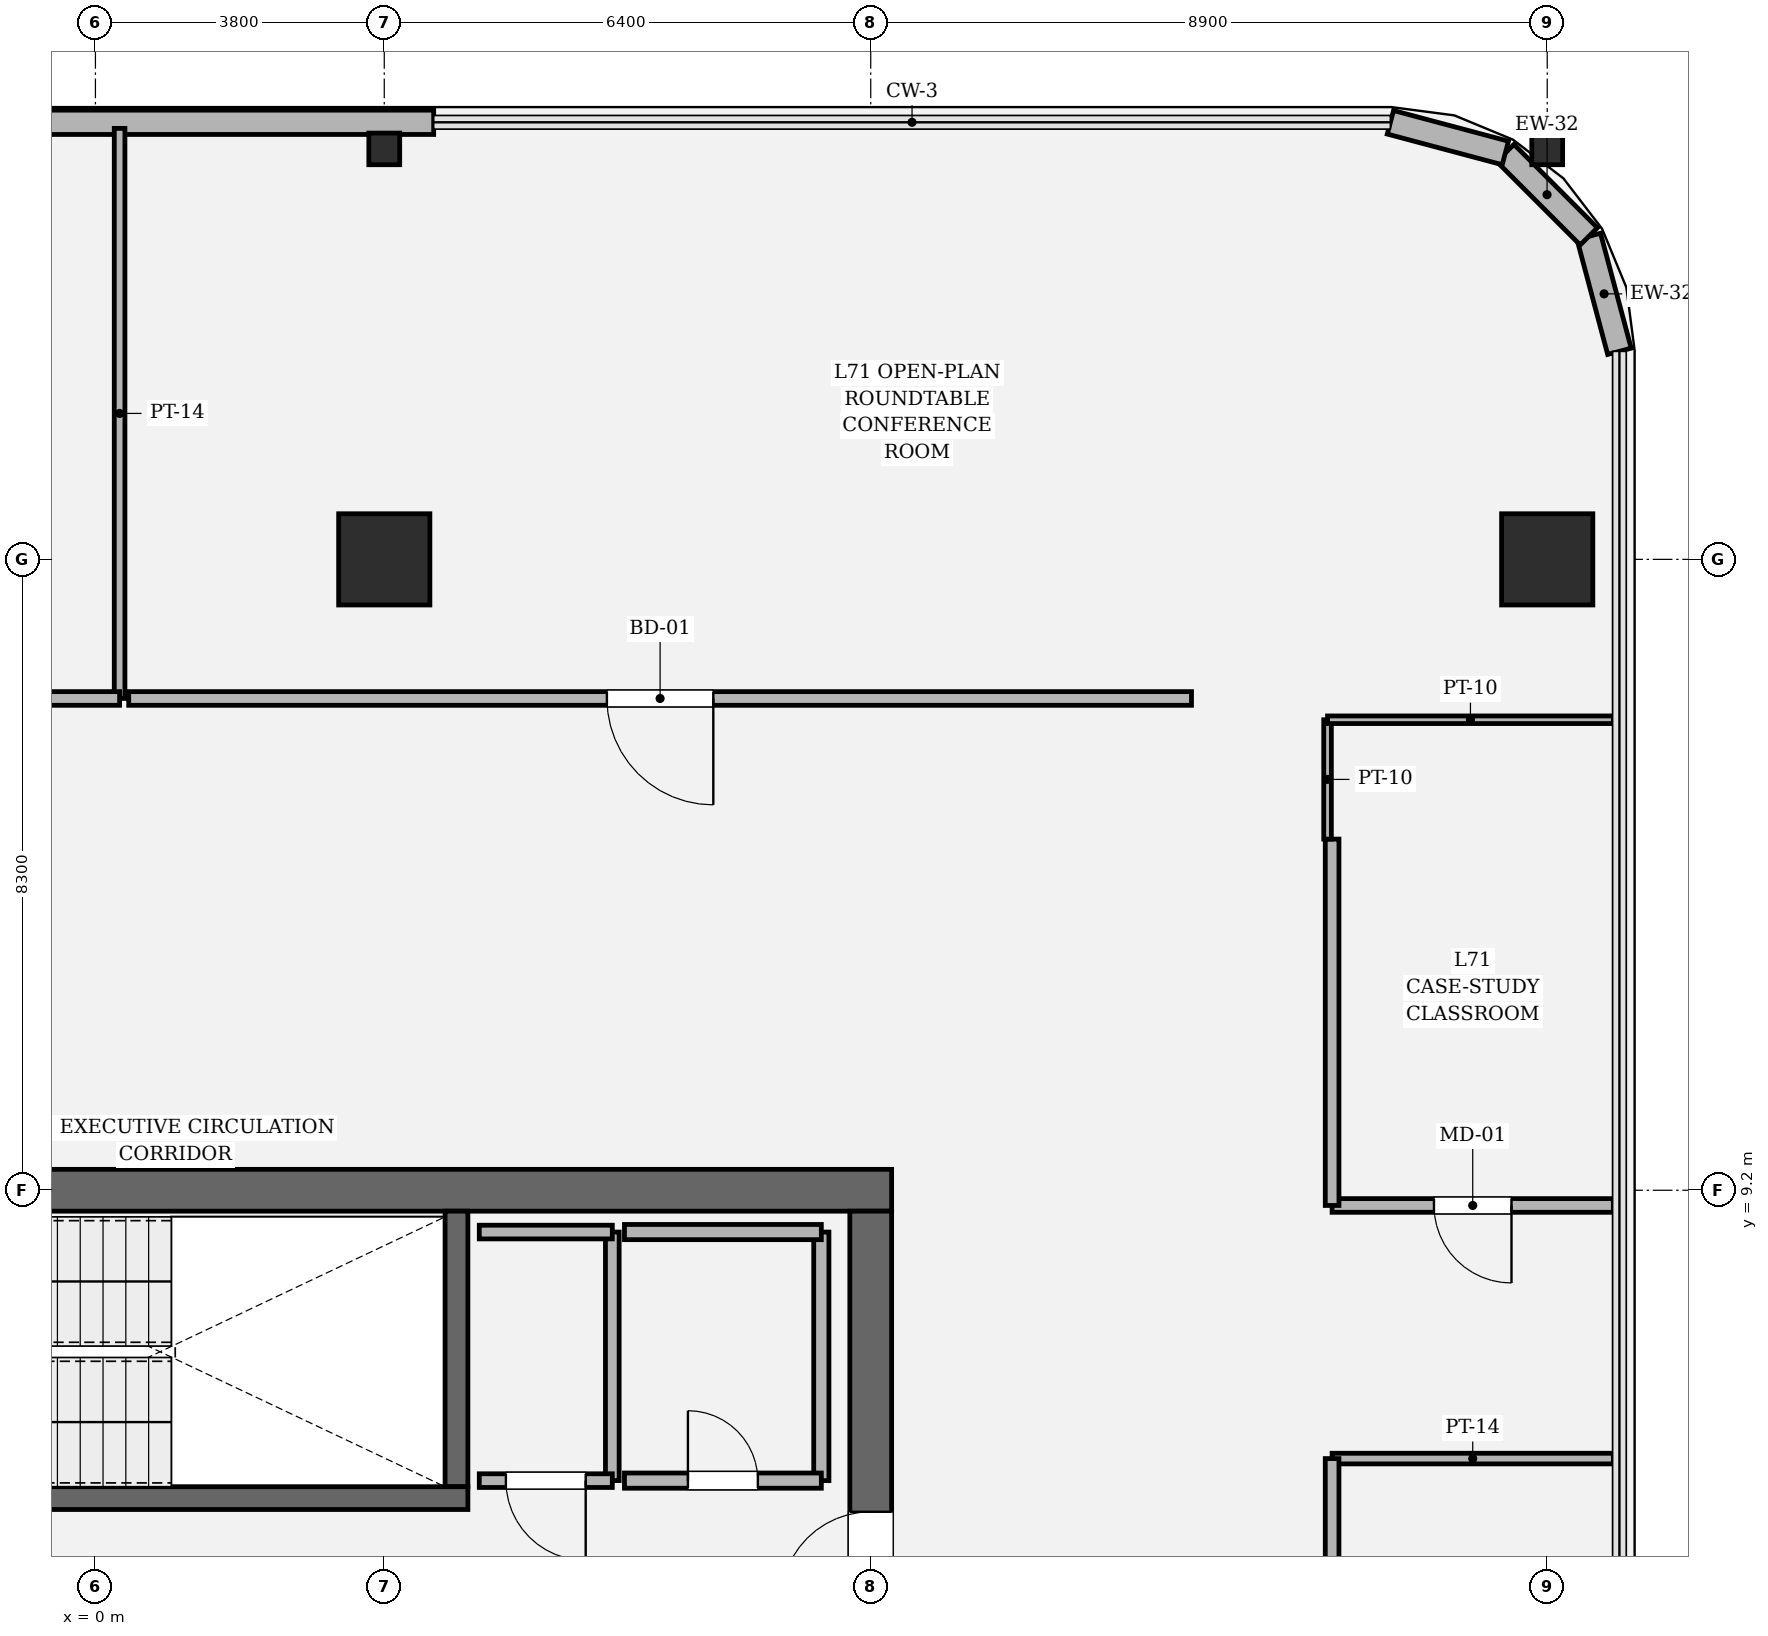
"""IFC4 building model, lengths in metres.
Left out: names, types, materials, properties, quantities, classifications, styles, units other than length and angle.
Written with IfcOpenShell. Run it as: python <this file> out.ifc"""

import sys

from ifc_helpers import new_model, si_unit, direction, frame, frame_2d, origin, origin_2d, place, context, subcontext, project, spatial, rectangle, hollow_rectangle, i_section, extrude, element, fill, save


model = new_model("IFC4")
c1 = context("Model", 3, precision=1e-05, world=origin(), true_north=direction((0.0, 1.0)))
c2 = subcontext(c1, "Body", "Model", "MODEL_VIEW")
j1 = project(units=[si_unit("LENGTHUNIT", "METRE"), si_unit("PLANEANGLEUNIT", "RADIAN")], contexts=[c1])
p1 = place(None, origin())
s1 = spatial("IfcSite", under=j1, at=p1, CompositionType="ELEMENT")
p2 = place(p1, origin())
s2 = spatial("IfcBuilding", under=s1, at=p2, CompositionType="ELEMENT")
p3 = place(p2, frame((0.0, 0.0, 300.6)))
s3 = spatial("IfcBuildingStorey", under=s2, at=p3, CompositionType="ELEMENT", Elevation=300.6)
p4 = place(p3, frame((-10.475, 9.2, 0.0), z_axis=(0.0, 0.0, 1.0), x_axis=(1.0, 0.0, 0.0)))
e1 = element("IfcWall", 1, at=p4, inside=s3, PredefinedType="SHEAR", context=c2, shape_type="SweptSolid", body=[
    extrude(rectangle(XDim=20.95, YDim=0.55, at=frame_2d((10.475, 0.0))), origin(), (0.0, 0.0, 1.0), 4.2),
])
p5 = place(p3, frame((10.2, 8.925, 0.0), z_axis=(0.0, 0.0, 1.0), x_axis=(0.0, -1.0, 0.0)))
e2 = element("IfcWall", 2, at=p5, inside=s3, PredefinedType="SHEAR", context=c2, shape_type="SweptSolid", body=[
    extrude(rectangle(XDim=17.85, YDim=0.55, at=frame_2d((8.925, 0.0))), origin(), (0.0, 0.0, 1.0), 4.2),
])
p6 = place(p5, frame((3.955, 0.0, 0.0)))
e3 = element("IfcOpeningElement", 3, at=p6, cuts=e2, PredefinedType="OPENING", context=c2, shape_type="SweptSolid", body=[
    extrude(rectangle(XDim=1.18, YDim=2.2, at=frame_2d((0.59, 1.1))), frame((0.0, 0.285, 0.0), z_axis=(0.0, -1.0, 0.0), x_axis=(1.0, 0.0, 0.0)), (0.0, 0.0, 1.0), 0.57),
])
p7 = place(p3, frame((4.75, 8.925, 0.0), z_axis=(0.0, 0.0, 1.0), x_axis=(0.0, -1.0, 0.0)))
e4 = element("IfcWall", 4, at=p7, inside=s3, PredefinedType="SOLIDWALL", context=c2, shape_type="SweptSolid", body=[
    extrude(rectangle(XDim=3.625, YDim=0.3, at=frame_2d((1.812, 0.0))), origin(), (0.0, 0.0, 1.0), 4.2),
])
p8 = place(p3, frame((-4.9, 5.15, 0.0), z_axis=(0.0, 0.0, 1.0), x_axis=(1.0, 0.0, 0.0)))
e5 = element("IfcWall", 5, at=p8, inside=s3, PredefinedType="SOLIDWALL", context=c2, shape_type="SweptSolid", body=[
    extrude(rectangle(XDim=9.8, YDim=0.3, at=frame_2d((4.9, 0.0))), origin(), (0.0, 0.0, 1.0), 4.2),
])
p9 = place(p8, frame((0.56, 0.0, 0.0)))
e6 = element("IfcOpeningElement", 6, at=p9, cuts=e5, PredefinedType="OPENING", context=c2, shape_type="SweptSolid", body=[
    extrude(rectangle(XDim=1.18, YDim=2.2, at=frame_2d((0.59, 1.1))), frame((0.0, 0.16, 0.0), z_axis=(0.0, -1.0, 0.0), x_axis=(1.0, 0.0, 0.0)), (0.0, 0.0, 1.0), 0.32),
])
for number, where, z_axis, x_axis in (
    (7, (19.1, 17.5, 0.0), (0.0, 0.0, 1.0), (1.0, 0.0, 0.0)),
    (8, (3.8, 17.5, 0.0), (0.0, 0.0, 1.0), (1.0, 0.0, 0.0)),
):
    element("IfcColumn", number, at=place(p3, frame(where, z_axis=z_axis, x_axis=x_axis)), inside=s3, PredefinedType="COLUMN", context=c2, shape_type="SweptSolid", body=[
        extrude(hollow_rectangle(XDim=1.2, YDim=1.2, WallThickness=0.035, at=origin_2d()), origin(), (0.0, 0.0, 1.0), 4.2),
    ])
for number, where, z_axis, x_axis in (
    (9, (3.8, 22.9, 0.0), (0.0, 0.0, 1.0), (1.0, 0.0, 0.0)),
    (10, (19.1, 22.9, 0.0), (0.0, 0.0, 1.0), (1.0, 0.0, 0.0)),
):
    element("IfcColumn", number, at=place(p3, frame(where, z_axis=z_axis, x_axis=x_axis)), inside=s3, PredefinedType="COLUMN", context=c2, shape_type="SweptSolid", body=[
        extrude(i_section(OverallWidth=0.406, OverallDepth=0.416, WebThickness=0.029, FlangeThickness=0.048, FilletRadius=0.018, at=origin_2d()), origin(), (0.0, 0.0, 1.0), 4.198),
    ])
p10 = place(p3, frame((20.05, 20.237, 0.0), z_axis=(0.0, 0.0, 1.0), x_axis=(-0.257847112249, 0.966185730957, 0.0)))
e11 = element("IfcWall", 11, at=p10, inside=s3, PredefinedType="SOLIDWALL", context=c2, shape_type="SweptSolid", body=[
    extrude(rectangle(XDim=1.565, YDim=0.32, at=frame_2d((0.783, 0.0))), origin(), (0.0, 0.0, 1.0), 4.0),
])
p11 = place(p3, frame((19.646, 21.749, 0.0), z_axis=(0.0, 0.0, 1.0), x_axis=(-0.707028130747, 0.707185422879, 0.0)))
e12 = element("IfcWall", 12, at=p11, inside=s3, PredefinedType="SOLIDWALL", context=c2, shape_type="SweptSolid", body=[
    extrude(rectangle(XDim=1.552, YDim=0.32, at=frame_2d((0.776, 0.0))), origin(), (0.0, 0.0, 1.0), 2.674),
])
p12 = place(p3, frame((18.549, 22.847, 0.0), z_axis=(0.0, 0.0, 1.0), x_axis=(-0.966224582397, 0.257701486942, 0.0)))
e13 = element("IfcWall", 13, at=p12, inside=s3, PredefinedType="SOLIDWALL", context=c2, shape_type="SweptSolid", body=[
    extrude(rectangle(XDim=1.565, YDim=0.32, at=frame_2d((0.783, 0.0))), origin(), (0.0, 0.0, 1.0), 2.714),
])
p13 = place(p3, frame((4.45, 23.25, 0.0), z_axis=(0.0, 0.0, 1.0), x_axis=(-1.0, 0.0, 0.0)))
e14 = element("IfcWall", 14, at=p13, inside=s3, PredefinedType="SOLIDWALL", context=c2, shape_type="SweptSolid", body=[
    extrude(rectangle(XDim=8.9, YDim=0.32, at=frame_2d((4.45, 0.0))), origin(), (0.0, 0.0, 1.0), 2.714),
])
p14 = place(p3, frame((6.8, 5.38, 0.0), z_axis=(0.0, 0.0, 1.0), x_axis=(0.0, 1.0, 0.0)))
e15 = element("IfcWall", 15, at=p14, inside=s3, PredefinedType="PARTITIONING", context=c2, shape_type="SweptSolid", body=[
    extrude(rectangle(XDim=3.27, YDim=0.18, at=frame_2d((1.635, 0.0))), origin(), (0.0, 0.0, 1.0), 4.0),
])
p15 = place(p3, frame((6.8, 8.65, 0.0), z_axis=(0.0, 0.0, 1.0), x_axis=(-1.0, 0.0, 0.0)))
e16 = element("IfcWall", 16, at=p15, inside=s3, PredefinedType="PARTITIONING", context=c2, shape_type="SweptSolid", body=[
    extrude(rectangle(XDim=1.75, YDim=0.18, at=frame_2d((0.875, 0.0))), origin(), (0.0, 0.0, 1.0), 4.0),
])
p16 = place(p3, frame((5.05, 5.38, 0.0), z_axis=(0.0, 0.0, 1.0), x_axis=(1.0, 0.0, 0.0)))
e17 = element("IfcWall", 17, at=p16, inside=s3, PredefinedType="PARTITIONING", context=c2, shape_type="SweptSolid", body=[
    extrude(rectangle(XDim=1.75, YDim=0.18, at=frame_2d((0.875, 0.0))), origin(), (0.0, 0.0, 1.0), 4.0),
])
p17 = place(p16, frame((0.35, 0.0, 0.0)))
e18 = element("IfcOpeningElement", 18, at=p17, cuts=e17, PredefinedType="OPENING", context=c2, shape_type="SweptSolid", body=[
    extrude(rectangle(XDim=1.05, YDim=2.2, at=frame_2d((0.525, 1.1))), frame((0.0, 0.1, 0.0), z_axis=(0.0, -1.0, 0.0), x_axis=(1.0, 0.0, 0.0)), (0.0, 0.0, 1.0), 0.2),
])
p18 = place(p3, frame((9.55, 5.38, 0.0), z_axis=(0.0, 0.0, 1.0), x_axis=(0.0, 1.0, 0.0)))
e19 = element("IfcWall", 19, at=p18, inside=s3, PredefinedType="SOLIDWALL", context=c2, shape_type="SweptSolid", body=[
    extrude(rectangle(XDim=3.27, YDim=0.2, at=frame_2d((1.635, 0.0))), origin(), (0.0, 0.0, 1.0), 4.0),
])
p19 = place(p3, frame((9.55, 8.65, 0.0), z_axis=(0.0, 0.0, 1.0), x_axis=(-1.0, 0.0, 0.0)))
e20 = element("IfcWall", 20, at=p19, inside=s3, PredefinedType="SOLIDWALL", context=c2, shape_type="SweptSolid", body=[
    extrude(rectangle(XDim=2.59, YDim=0.2, at=frame_2d((1.295, 0.0))), origin(), (0.0, 0.0, 1.0), 4.0),
])
p20 = place(p3, frame((6.96, 5.38, 0.0), z_axis=(0.0, 0.0, 1.0), x_axis=(1.0, 0.0, 0.0)))
e21 = element("IfcWall", 21, at=p20, inside=s3, PredefinedType="SOLIDWALL", context=c2, shape_type="SweptSolid", body=[
    extrude(rectangle(XDim=2.59, YDim=0.2, at=frame_2d((1.295, 0.0))), origin(), (0.0, 0.0, 1.0), 4.0),
])
p21 = place(p20, frame((0.835, 0.0, 0.0)))
e22 = element("IfcOpeningElement", 22, at=p21, cuts=e21, PredefinedType="OPENING", context=c2, shape_type="SweptSolid", body=[
    extrude(rectangle(XDim=0.92, YDim=2.1, at=frame_2d((0.46, 1.05))), frame((0.0, 0.11, 0.0), z_axis=(0.0, -1.0, 0.0), x_axis=(1.0, 0.0, 0.0)), (0.0, 0.0, 1.0), 0.22),
])
p22 = place(p3, frame((16.27, 5.67, 0.0), z_axis=(0.0, 0.0, 1.0), x_axis=(1.0, 0.0, 0.0)))
e23 = element("IfcWall", 23, at=p22, inside=s3, PredefinedType="PARTITIONING", context=c2, shape_type="SweptSolid", body=[
    extrude(rectangle(XDim=3.7, YDim=0.14, at=frame_2d((1.85, 0.0))), origin(), (0.0, 0.0, 1.0), 3.394),
])
p23 = place(p3, frame((16.27, -11.49, 0.0), z_axis=(0.0, 0.0, 1.0), x_axis=(0.0, 1.0, 0.0)))
e24 = element("IfcWall", 24, at=p23, inside=s3, PredefinedType="PARTITIONING", context=c2, shape_type="SweptSolid", body=[
    extrude(rectangle(XDim=17.16, YDim=0.18, at=frame_2d((8.58, 0.0))), origin(), (0.0, 0.0, 1.0), 3.394),
])
p24 = place(p23, frame((8.055, 0.0, 0.0)))
e25 = element("IfcOpeningElement", 25, at=p24, cuts=e24, PredefinedType="OPENING", context=c2, shape_type="SweptSolid", body=[
    extrude(rectangle(XDim=1.05, YDim=2.2, at=frame_2d((0.525, 1.1))), frame((0.0, 0.1, 0.0), z_axis=(0.0, -1.0, 0.0), x_axis=(1.0, 0.0, 0.0)), (0.0, 0.0, 1.0), 0.2),
])
p25 = place(p3, frame((19.97, 9.0, 0.0), z_axis=(0.0, 0.0, 1.0), x_axis=(-1.0, 0.0, 0.0)))
e26 = element("IfcWall", 26, at=p25, inside=s3, PredefinedType="PARTITIONING", context=c2, shape_type="SweptSolid", body=[
    extrude(rectangle(XDim=3.7, YDim=0.18, at=frame_2d((1.85, 0.0))), origin(), (0.0, 0.0, 1.0), 3.394),
])
p26 = place(p25, frame((1.34, 0.0, 0.0)))
e27 = element("IfcOpeningElement", 27, at=p26, cuts=e26, PredefinedType="OPENING", context=c2, shape_type="SweptSolid", body=[
    extrude(rectangle(XDim=1.02, YDim=2.2, at=frame_2d((0.51, 1.1))), frame((0.0, 0.1, 0.0), z_axis=(0.0, -1.0, 0.0), x_axis=(1.0, 0.0, 0.0)), (0.0, 0.0, 1.0), 0.2),
])
p27 = place(p3, frame((16.27, 9.0, 0.0), z_axis=(0.0, 0.0, 1.0), x_axis=(0.0, 1.0, 0.0)))
e28 = element("IfcWall", 28, at=p27, inside=s3, PredefinedType="PARTITIONING", context=c2, shape_type="SweptSolid", body=[
    extrude(rectangle(XDim=4.82, YDim=0.18, at=frame_2d((2.41, 0.0))), origin(), (0.0, 0.0, 1.0), 3.394),
])
p28 = place(p3, frame((16.21, 13.82, 0.0), z_axis=(0.0, 0.0, 1.0), x_axis=(0.0, 1.0, 0.0)))
e29 = element("IfcWall", 29, at=p28, inside=s3, PredefinedType="PARTITIONING", context=c2, shape_type="SweptSolid", body=[
    extrude(rectangle(XDim=1.57, YDim=0.1, at=frame_2d((0.785, 0.0))), origin(), (0.0, 0.0, 1.0), 4.0),
])
p29 = place(p3, frame((16.21, 15.39, 0.0), z_axis=(0.0, 0.0, 1.0), x_axis=(1.0, 0.0, 0.0)))
e30 = element("IfcWall", 30, at=p29, inside=s3, PredefinedType="PARTITIONING", context=c2, shape_type="SweptSolid", body=[
    extrude(rectangle(XDim=3.76, YDim=0.1, at=frame_2d((1.88, 0.0))), origin(), (0.0, 0.0, 1.0), 3.394),
])
p30 = place(p3, frame((0.318, 23.17, 0.0), z_axis=(0.0, 0.0, 1.0), x_axis=(0.0, -1.0, 0.0)))
e31 = element("IfcWall", 31, at=p30, inside=s3, PredefinedType="PARTITIONING", context=c2, shape_type="SweptSolid", body=[
    extrude(rectangle(XDim=7.5, YDim=0.14, at=frame_2d((3.75, 0.0))), origin(), (0.0, 0.0, 1.0), 2.714),
])
p31 = place(p3, frame((0.318, 15.67, 0.0), z_axis=(0.0, 0.0, 1.0), x_axis=(-1.0, 0.0, 0.0)))
e32 = element("IfcWall", 32, at=p31, inside=s3, PredefinedType="PARTITIONING", context=c2, shape_type="SweptSolid", body=[
    extrude(rectangle(XDim=13.088, YDim=0.18, at=frame_2d((6.544, 0.0))), origin(), (0.0, 0.0, 1.0), 3.394),
])
p32 = place(p31, frame((5.844, 0.0, 0.0)))
e33 = element("IfcOpeningElement", 33, at=p32, cuts=e32, PredefinedType="OPENING", context=c2, shape_type="SweptSolid", body=[
    extrude(rectangle(XDim=1.4, YDim=2.25, at=frame_2d((0.7, 1.125))), frame((0.0, 0.1, 0.0), z_axis=(0.0, -1.0, 0.0), x_axis=(1.0, 0.0, 0.0)), (0.0, 0.0, 1.0), 0.2),
])
p33 = place(p3, frame((14.42, 15.67, 0.0), z_axis=(0.0, 0.0, 1.0), x_axis=(-1.0, 0.0, 0.0)))
e34 = element("IfcWall", 34, at=p33, inside=s3, PredefinedType="PARTITIONING", context=c2, shape_type="SweptSolid", body=[
    extrude(rectangle(XDim=13.982, YDim=0.18, at=frame_2d((6.991, 0.0))), origin(), (0.0, 0.0, 1.0), 3.394),
])
p34 = place(p33, frame((6.291, 0.0, 0.0)))
e35 = element("IfcOpeningElement", 35, at=p34, cuts=e34, PredefinedType="OPENING", context=c2, shape_type="SweptSolid", body=[
    extrude(rectangle(XDim=1.4, YDim=2.25, at=frame_2d((0.7, 1.125))), frame((0.0, 0.1, 0.0), z_axis=(0.0, -1.0, 0.0), x_axis=(1.0, 0.0, 0.0)), (0.0, 0.0, 1.0), 0.2),
])
p35 = place(p6, origin())
e36 = element("IfcDoor", 36, at=p35, inside=s3, OperationType="SINGLE_SWING_RIGHT", PredefinedType="DOOR", context=c2, shape_type="SweptSolid", body=[
    extrude(rectangle(XDim=1.18, YDim=2.2, at=frame_2d((0.59, 1.1))), frame((0.0, 0.025, 0.0), z_axis=(0.0, -1.0, 0.0), x_axis=(1.0, 0.0, 0.0)), (0.0, 0.0, 1.0), 0.05),
])
fill(e3, e36)
p36 = place(p17, origin())
e37 = element("IfcDoor", 37, at=p36, inside=s3, OperationType="SINGLE_SWING_RIGHT", PredefinedType="DOOR", context=c2, shape_type="SweptSolid", body=[
    extrude(rectangle(XDim=1.05, YDim=2.2, at=frame_2d((0.525, 1.1))), frame((0.0, 0.025, 0.0), z_axis=(0.0, -1.0, 0.0), x_axis=(1.0, 0.0, 0.0)), (0.0, 0.0, 1.0), 0.05),
])
fill(e18, e37)
p37 = place(p21, origin())
e38 = element("IfcDoor", 38, at=p37, inside=s3, OperationType="SINGLE_SWING_LEFT", PredefinedType="DOOR", context=c2, shape_type="SweptSolid", body=[
    extrude(rectangle(XDim=0.92, YDim=2.1, at=frame_2d((0.46, 1.05))), frame((0.0, 0.025, 0.0), z_axis=(0.0, -1.0, 0.0), x_axis=(1.0, 0.0, 0.0)), (0.0, 0.0, 1.0), 0.05),
])
fill(e22, e38)
p38 = place(p26, origin())
e39 = element("IfcDoor", 39, at=p38, inside=s3, OperationType="SINGLE_SWING_LEFT", PredefinedType="DOOR", context=c2, shape_type="SweptSolid", body=[
    extrude(rectangle(XDim=1.02, YDim=2.2, at=frame_2d((0.51, 1.1))), frame((0.0, 0.025, 0.0), z_axis=(0.0, -1.0, 0.0), x_axis=(1.0, 0.0, 0.0)), (0.0, 0.0, 1.0), 0.05),
])
fill(e27, e39)
p39 = place(p34, origin())
e40 = element("IfcDoor", 40, at=p39, inside=s3, OperationType="SINGLE_SWING_LEFT", PredefinedType="DOOR", context=c2, shape_type="SweptSolid", body=[
    extrude(rectangle(XDim=1.4, YDim=2.25, at=frame_2d((0.7, 1.125))), frame((0.0, 0.025, 0.0), z_axis=(0.0, -1.0, 0.0), x_axis=(1.0, 0.0, 0.0)), (0.0, 0.0, 1.0), 0.05),
])
fill(e35, e40)
save(model, sys.argv[1])
